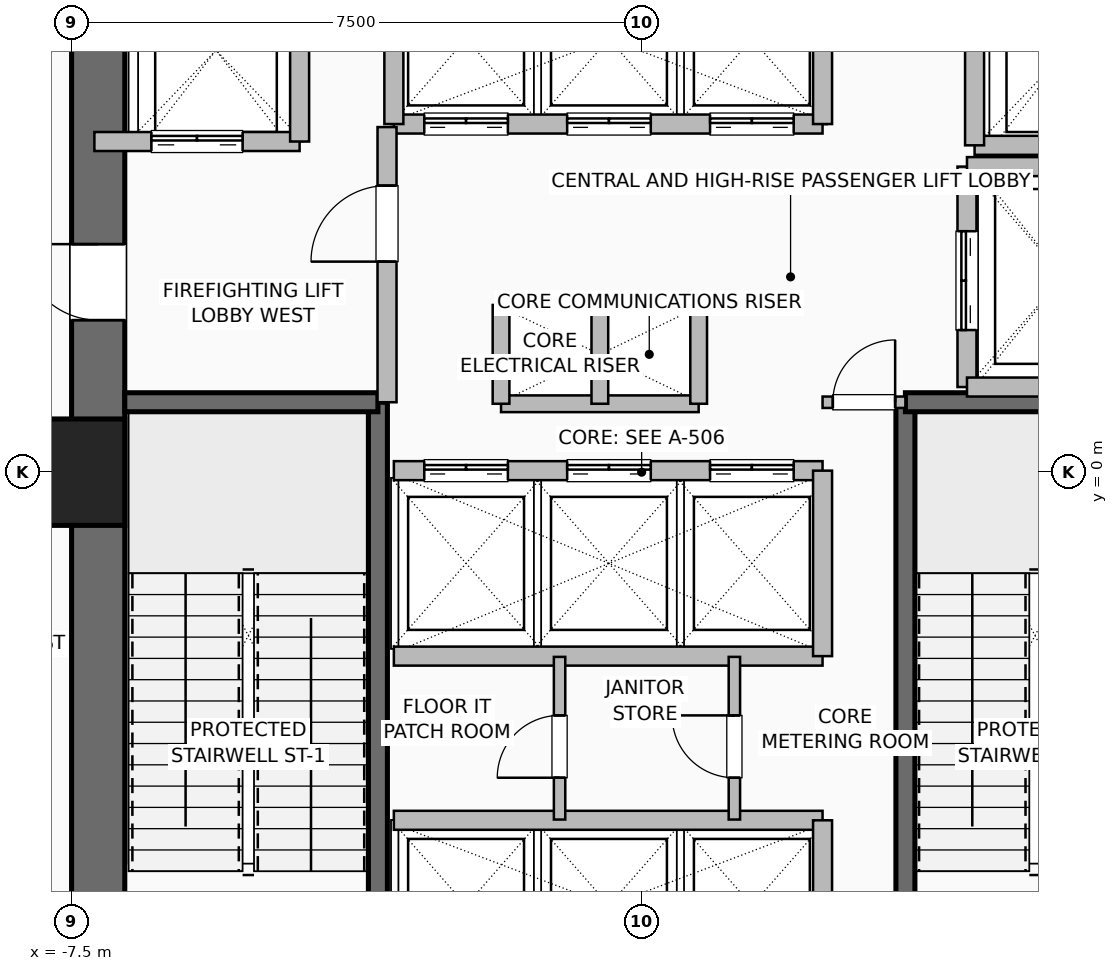
"""IFC4 building model, lengths in metres.
Left out: names, types, materials, properties, quantities, classifications, styles, units other than length and angle.
Written with IfcOpenShell. Run it as: python <this file> out.ifc"""

import sys

from ifc_helpers import new_model, si_unit, direction, frame, frame_2d, origin, origin_2d, place, context, subcontext, project, spatial, rectangle, hollow_rectangle, extrude, element, fill, save


model = new_model("IFC4")
c1 = context("Model", 3, precision=1e-05, world=origin(), true_north=direction((0.0, 1.0)))
c2 = subcontext(c1, "Body", "Model", "MODEL_VIEW")
j1 = project(units=[si_unit("LENGTHUNIT", "METRE"), si_unit("PLANEANGLEUNIT", "RADIAN")], contexts=[c1])
p1 = place(None, origin())
s1 = spatial("IfcSite", under=j1, at=p1, CompositionType="ELEMENT")
p2 = place(p1, origin())
s2 = spatial("IfcBuilding", under=s1, at=p2, CompositionType="ELEMENT")
p3 = place(p2, frame((0.0, 0.0, 16.2)))
s3 = spatial("IfcBuildingStorey", under=s2, at=p3, CompositionType="ELEMENT", Elevation=16.2)
p4 = place(p3, frame((-7.5, 0.0, 0.0), z_axis=(0.0, 0.0, 1.0), x_axis=(1.0, 0.0, 0.0)))
e1 = element("IfcColumn", 1, at=p4, inside=s3, PredefinedType="COLUMN", context=c2, shape_type="SweptSolid", body=[
    extrude(hollow_rectangle(XDim=1.4, YDim=1.4, WallThickness=0.06, at=origin_2d()), origin(), (0.0, 0.0, 1.0), 5.4),
])
p5 = place(p3, frame((-7.15, -7.5, 0.0), z_axis=(0.0, 0.0, 1.0), x_axis=(0.0, 1.0, 0.0)))
e2 = element("IfcWall", 2, at=p5, inside=s3, PredefinedType="SHEAR", context=c2, shape_type="SweptSolid", body=[
    extrude(rectangle(XDim=15.0, YDim=0.7, at=frame_2d((7.5, 0.0))), origin(), (0.0, 0.0, 1.0), 5.0),
])
p6 = place(p5, frame((9.5, 0.0, 0.0)))
e3 = element("IfcOpeningElement", 3, at=p6, cuts=e2, PredefinedType="OPENING", context=c2, shape_type="SweptSolid", body=[
    extrude(rectangle(XDim=1.0, YDim=2.08, at=frame_2d((0.5, 1.04))), frame((0.0, 0.36, 0.0), z_axis=(0.0, -1.0, 0.0), x_axis=(1.0, 0.0, 0.0)), (0.0, 0.0, 1.0), 0.72),
])
p7 = place(p3, frame((-3.47, -6.8, 0.0), z_axis=(0.0, 0.0, 1.0), x_axis=(0.0, 1.0, 0.0)))
e4 = element("IfcWall", 4, at=p7, inside=s3, PredefinedType="SHEAR", context=c2, shape_type="SweptSolid", body=[
    extrude(rectangle(XDim=7.72, YDim=0.25, at=frame_2d((3.86, 0.0))), origin(), (0.0, 0.0, 1.0), 5.0),
])
p8 = place(p3, frame((-6.8, 0.92, 0.0), z_axis=(0.0, 0.0, 1.0), x_axis=(1.0, 0.0, 0.0)))
e5 = element("IfcWall", 5, at=p8, inside=s3, PredefinedType="SHEAR", context=c2, shape_type="SweptSolid", body=[
    extrude(rectangle(XDim=3.33, YDim=0.25, at=frame_2d((1.665, 0.0))), origin(), (0.0, 0.0, 1.0), 5.0),
])
p9 = place(p3, frame((3.47, -6.8, 0.0), z_axis=(0.0, 0.0, 1.0), x_axis=(0.0, 1.0, 0.0)))
e6 = element("IfcWall", 6, at=p9, inside=s3, PredefinedType="SHEAR", context=c2, shape_type="SweptSolid", body=[
    extrude(rectangle(XDim=7.72, YDim=0.25, at=frame_2d((3.86, 0.0))), origin(), (0.0, 0.0, 1.0), 5.0),
])
p10 = place(p3, frame((3.47, 0.92, 0.0), z_axis=(0.0, 0.0, 1.0), x_axis=(1.0, 0.0, 0.0)))
e7 = element("IfcWall", 7, at=p10, inside=s3, PredefinedType="SHEAR", context=c2, shape_type="SweptSolid", body=[
    extrude(rectangle(XDim=3.33, YDim=0.25, at=frame_2d((1.665, 0.0))), origin(), (0.0, 0.0, 1.0), 5.0),
])
for number, where, z_axis, x_axis in (
    (8, (-1.85, 2.2, 0.0), (0.0, 0.0, 1.0), (1.0, 0.0, 0.0)),
    (9, (-1.85, 0.9, 0.0), (0.0, 0.0, 1.0), (1.0, 0.0, 0.0)),
):
    element("IfcWall", number, at=place(p3, frame(where, z_axis=z_axis, x_axis=x_axis)), inside=s3, PredefinedType="PARTITIONING", context=c2, shape_type="SweptSolid", body=[
        extrude(rectangle(XDim=2.6, YDim=0.22, at=frame_2d((1.3, 0.0))), origin(), (0.0, 0.0, 1.0), 5.0),
    ])
for number, where, z_axis, x_axis in (
    (10, (-0.55, 0.9, 0.0), (0.0, 0.0, 1.0), (0.0, 1.0, 0.0)),
    (11, (0.75, 0.9, 0.0), (0.0, 0.0, 1.0), (0.0, 1.0, 0.0)),
    (12, (-1.85, 0.9, 0.0), (0.0, 0.0, 1.0), (0.0, 1.0, 0.0)),
):
    element("IfcWall", number, at=place(p3, frame(where, z_axis=z_axis, x_axis=x_axis)), inside=s3, PredefinedType="PARTITIONING", context=c2, shape_type="SweptSolid", body=[
        extrude(rectangle(XDim=1.3, YDim=0.22, at=frame_2d((0.65, 0.0))), origin(), (0.0, 0.0, 1.0), 5.0),
    ])
p11 = place(p3, frame((-3.26, -4.58, 0.0), z_axis=(0.0, 0.0, 1.0), x_axis=(1.0, 0.0, 0.0)))
e13 = element("IfcWall", 13, at=p11, inside=s3, PredefinedType="SHEAR", context=c2, shape_type="SweptSolid", body=[
    extrude(rectangle(XDim=5.64, YDim=0.25, at=frame_2d((2.82, 0.0))), origin(), (0.0, 0.0, 1.0), 5.0),
])
p12 = place(p3, frame((2.38, -6.8, 0.0), z_axis=(0.0, 0.0, 1.0), x_axis=(0.0, 1.0, 0.0)))
e14 = element("IfcWall", 14, at=p12, inside=s3, PredefinedType="SHEAR", context=c2, shape_type="SweptSolid", body=[
    extrude(rectangle(XDim=2.22, YDim=0.25, at=frame_2d((1.11, 0.0))), origin(), (0.0, 0.0, 1.0), 5.0),
])
p13 = place(p3, frame((-3.26, 0.02, 0.0), z_axis=(0.0, 0.0, 1.0), x_axis=(1.0, 0.0, 0.0)))
e15 = element("IfcWall", 15, at=p13, inside=s3, PredefinedType="SHEAR", context=c2, shape_type="SweptSolid", body=[
    extrude(rectangle(XDim=5.64, YDim=0.25, at=frame_2d((2.82, 0.0))), origin(), (0.0, 0.0, 1.0), 5.0),
])
p14 = place(p13, frame((0.4, 0.0, 0.0)))
e16 = element("IfcOpeningElement", 16, at=p14, cuts=e15, PredefinedType="OPENING", context=c2, shape_type="SweptSolid", body=[
    extrude(rectangle(XDim=1.1, YDim=2.2, at=frame_2d((0.55, 1.1))), frame((0.0, 0.135, 0.0), z_axis=(0.0, -1.0, 0.0), x_axis=(1.0, 0.0, 0.0)), (0.0, 0.0, 1.0), 0.27),
])
p15 = place(p13, frame((2.28, 0.0, 0.0)))
e17 = element("IfcOpeningElement", 17, at=p15, cuts=e15, PredefinedType="OPENING", context=c2, shape_type="SweptSolid", body=[
    extrude(rectangle(XDim=1.1, YDim=2.2, at=frame_2d((0.55, 1.1))), frame((0.0, 0.135, 0.0), z_axis=(0.0, -1.0, 0.0), x_axis=(1.0, 0.0, 0.0)), (0.0, 0.0, 1.0), 0.27),
])
p16 = place(p13, frame((4.16, 0.0, 0.0)))
e18 = element("IfcOpeningElement", 18, at=p16, cuts=e15, PredefinedType="OPENING", context=c2, shape_type="SweptSolid", body=[
    extrude(rectangle(XDim=1.1, YDim=2.2, at=frame_2d((0.55, 1.1))), frame((0.0, 0.135, 0.0), z_axis=(0.0, -1.0, 0.0), x_axis=(1.0, 0.0, 0.0)), (0.0, 0.0, 1.0), 0.27),
])
p17 = place(p3, frame((-3.26, -2.42, 0.0), z_axis=(0.0, 0.0, 1.0), x_axis=(1.0, 0.0, 0.0)))
e19 = element("IfcWall", 19, at=p17, inside=s3, PredefinedType="SHEAR", context=c2, shape_type="SweptSolid", body=[
    extrude(rectangle(XDim=5.64, YDim=0.25, at=frame_2d((2.82, 0.0))), origin(), (0.0, 0.0, 1.0), 5.0),
])
p18 = place(p3, frame((2.38, -2.42, 0.0), z_axis=(0.0, 0.0, 1.0), x_axis=(0.0, 1.0, 0.0)))
e20 = element("IfcWall", 20, at=p18, inside=s3, PredefinedType="SHEAR", context=c2, shape_type="SweptSolid", body=[
    extrude(rectangle(XDim=2.44, YDim=0.25, at=frame_2d((1.22, 0.0))), origin(), (0.0, 0.0, 1.0), 5.0),
])
p19 = place(p3, frame((-3.26, 4.58, 0.0), z_axis=(0.0, 0.0, 1.0), x_axis=(1.0, 0.0, 0.0)))
e21 = element("IfcWall", 21, at=p19, inside=s3, PredefinedType="SHEAR", context=c2, shape_type="SweptSolid", body=[
    extrude(rectangle(XDim=5.64, YDim=0.25, at=frame_2d((2.82, 0.0))), origin(), (0.0, 0.0, 1.0), 5.0),
])
p20 = place(p19, frame((0.4, 0.0, 0.0)))
e22 = element("IfcOpeningElement", 22, at=p20, cuts=e21, PredefinedType="OPENING", context=c2, shape_type="SweptSolid", body=[
    extrude(rectangle(XDim=1.1, YDim=2.2, at=frame_2d((0.55, 1.1))), frame((0.0, 0.135, 0.0), z_axis=(0.0, -1.0, 0.0), x_axis=(1.0, 0.0, 0.0)), (0.0, 0.0, 1.0), 0.27),
])
p21 = place(p19, frame((2.28, 0.0, 0.0)))
e23 = element("IfcOpeningElement", 23, at=p21, cuts=e21, PredefinedType="OPENING", context=c2, shape_type="SweptSolid", body=[
    extrude(rectangle(XDim=1.1, YDim=2.2, at=frame_2d((0.55, 1.1))), frame((0.0, 0.135, 0.0), z_axis=(0.0, -1.0, 0.0), x_axis=(1.0, 0.0, 0.0)), (0.0, 0.0, 1.0), 0.27),
])
p22 = place(p19, frame((4.16, 0.0, 0.0)))
e24 = element("IfcOpeningElement", 24, at=p22, cuts=e21, PredefinedType="OPENING", context=c2, shape_type="SweptSolid", body=[
    extrude(rectangle(XDim=1.1, YDim=2.2, at=frame_2d((0.55, 1.1))), frame((0.0, 0.135, 0.0), z_axis=(0.0, -1.0, 0.0), x_axis=(1.0, 0.0, 0.0)), (0.0, 0.0, 1.0), 0.27),
])
for number, where, z_axis, x_axis in (
    (25, (-3.26, 4.58, 0.0), (0.0, 0.0, 1.0), (0.0, 1.0, 0.0)),
    (26, (2.38, 4.58, 0.0), (0.0, 0.0, 1.0), (0.0, 1.0, 0.0)),
):
    element("IfcWall", number, at=place(p3, frame(where, z_axis=z_axis, x_axis=x_axis)), inside=s3, PredefinedType="SHEAR", context=c2, shape_type="SweptSolid", body=[
        extrude(rectangle(XDim=2.22, YDim=0.25, at=frame_2d((1.11, 0.0))), origin(), (0.0, 0.0, 1.0), 5.0),
    ])
p23 = place(p3, frame((-7.2, 4.35, 0.0), z_axis=(0.0, 0.0, 1.0), x_axis=(1.0, 0.0, 0.0)))
e27 = element("IfcWall", 27, at=p23, inside=s3, PredefinedType="SHEAR", context=c2, shape_type="SweptSolid", body=[
    extrude(rectangle(XDim=2.7, YDim=0.25, at=frame_2d((1.35, 0.0))), origin(), (0.0, 0.0, 1.0), 5.0),
])
p24 = place(p23, frame((0.75, 0.0, 0.0)))
e28 = element("IfcOpeningElement", 28, at=p24, cuts=e27, PredefinedType="OPENING", context=c2, shape_type="SweptSolid", body=[
    extrude(rectangle(XDim=1.2, YDim=2.2, at=frame_2d((0.6, 1.1))), frame((0.0, 0.135, 0.0), z_axis=(0.0, -1.0, 0.0), x_axis=(1.0, 0.0, 0.0)), (0.0, 0.0, 1.0), 0.27),
])
p25 = place(p3, frame((-4.5, 4.35, 0.0), z_axis=(0.0, 0.0, 1.0), x_axis=(0.0, 1.0, 0.0)))
e29 = element("IfcWall", 29, at=p25, inside=s3, PredefinedType="SHEAR", context=c2, shape_type="SweptSolid", body=[
    extrude(rectangle(XDim=2.85, YDim=0.25, at=frame_2d((1.425, 0.0))), origin(), (0.0, 0.0, 1.0), 5.0),
])
p26 = place(p3, frame((4.38, 4.3, 0.0), z_axis=(0.0, 0.0, 1.0), x_axis=(1.0, 0.0, 0.0)))
e30 = element("IfcWall", 30, at=p26, inside=s3, PredefinedType="SHEAR", context=c2, shape_type="SweptSolid", body=[
    extrude(rectangle(XDim=2.42, YDim=0.25, at=frame_2d((1.21, 0.0))), origin(), (0.0, 0.0, 1.0), 5.0),
])
p27 = place(p3, frame((4.38, 4.3, 0.0), z_axis=(0.0, 0.0, 1.0), x_axis=(0.0, 1.0, 0.0)))
e31 = element("IfcWall", 31, at=p27, inside=s3, PredefinedType="SHEAR", context=c2, shape_type="SweptSolid", body=[
    extrude(rectangle(XDim=2.5, YDim=0.25, at=frame_2d((1.25, 0.0))), origin(), (0.0, 0.0, 1.0), 5.0),
])
p28 = place(p3, frame((4.28, 1.12, 0.0), z_axis=(0.0, 0.0, 1.0), x_axis=(0.0, 1.0, 0.0)))
e32 = element("IfcWall", 32, at=p28, inside=s3, PredefinedType="SHEAR", context=c2, shape_type="SweptSolid", body=[
    extrude(rectangle(XDim=2.9, YDim=0.25, at=frame_2d((1.45, 0.0))), origin(), (0.0, 0.0, 1.0), 5.0),
])
p29 = place(p28, frame((0.75, 0.0, 0.0)))
e33 = element("IfcOpeningElement", 33, at=p29, cuts=e32, PredefinedType="OPENING", context=c2, shape_type="SweptSolid", body=[
    extrude(rectangle(XDim=1.3, YDim=2.3, at=frame_2d((0.65, 1.15))), frame((0.0, 0.135, 0.0), z_axis=(0.0, -1.0, 0.0), x_axis=(1.0, 0.0, 0.0)), (0.0, 0.0, 1.0), 0.27),
])
for number, where, z_axis, x_axis in (
    (34, (4.28, 1.12, 0.0), (0.0, 0.0, 1.0), (1.0, 0.0, 0.0)),
    (35, (4.28, 4.02, 0.0), (0.0, 0.0, 1.0), (1.0, 0.0, 0.0)),
):
    element("IfcWall", number, at=place(p3, frame(where, z_axis=z_axis, x_axis=x_axis)), inside=s3, PredefinedType="SHEAR", context=c2, shape_type="SweptSolid", body=[
        extrude(rectangle(XDim=2.52, YDim=0.25, at=frame_2d((1.26, 0.0))), origin(), (0.0, 0.0, 1.0), 5.0),
    ])
p30 = place(p3, frame((-3.35, 0.92, 0.0), z_axis=(0.0, 0.0, 1.0), x_axis=(0.0, 1.0, 0.0)))
e36 = element("IfcWall", 36, at=p30, inside=s3, PredefinedType="SHEAR", context=c2, shape_type="SweptSolid", body=[
    extrude(rectangle(XDim=3.62, YDim=0.25, at=frame_2d((1.81, 0.0))), origin(), (0.0, 0.0, 1.0), 5.0),
])
p31 = place(p30, frame((1.85, 0.0, 0.0)))
e37 = element("IfcOpeningElement", 37, at=p31, cuts=e36, PredefinedType="OPENING", context=c2, shape_type="SweptSolid", body=[
    extrude(rectangle(XDim=1.0, YDim=2.08, at=frame_2d((0.5, 1.04))), frame((0.0, 0.135, 0.0), z_axis=(0.0, -1.0, 0.0), x_axis=(1.0, 0.0, 0.0)), (0.0, 0.0, 1.0), 0.27),
])
p32 = place(p3, frame((2.38, 0.92, 0.0), z_axis=(0.0, 0.0, 1.0), x_axis=(1.0, 0.0, 0.0)))
e38 = element("IfcWall", 38, at=p32, inside=s3, PredefinedType="PARTITIONING", context=c2, shape_type="SweptSolid", body=[
    extrude(rectangle(XDim=1.09, YDim=0.15, at=frame_2d((0.545, 0.0))), origin(), (0.0, 0.0, 1.0), 5.0),
])
p33 = place(p32, frame((0.135, 0.0, 0.0)))
e39 = element("IfcOpeningElement", 39, at=p33, cuts=e38, PredefinedType="OPENING", context=c2, shape_type="SweptSolid", body=[
    extrude(rectangle(XDim=0.82, YDim=2.05, at=frame_2d((0.41, 1.025))), frame((0.0, 0.085, 0.0), z_axis=(0.0, -1.0, 0.0), x_axis=(1.0, 0.0, 0.0)), (0.0, 0.0, 1.0), 0.17),
])
p34 = place(p3, frame((-1.08, -4.57, 0.0), z_axis=(0.0, 0.0, 1.0), x_axis=(0.0, 1.0, 0.0)))
e40 = element("IfcWall", 40, at=p34, inside=s3, PredefinedType="PARTITIONING", context=c2, shape_type="SweptSolid", body=[
    extrude(rectangle(XDim=2.14, YDim=0.15, at=frame_2d((1.07, 0.0))), origin(), (0.0, 0.0, 1.0), 5.0),
])
p35 = place(p34, frame((0.55, 0.0, 0.0)))
e41 = element("IfcOpeningElement", 41, at=p35, cuts=e40, PredefinedType="OPENING", context=c2, shape_type="SweptSolid", body=[
    extrude(rectangle(XDim=0.82, YDim=2.05, at=frame_2d((0.41, 1.025))), frame((0.0, 0.085, 0.0), z_axis=(0.0, -1.0, 0.0), x_axis=(1.0, 0.0, 0.0)), (0.0, 0.0, 1.0), 0.17),
])
p36 = place(p3, frame((1.22, -4.57, 0.0), z_axis=(0.0, 0.0, 1.0), x_axis=(0.0, 1.0, 0.0)))
e42 = element("IfcWall", 42, at=p36, inside=s3, PredefinedType="PARTITIONING", context=c2, shape_type="SweptSolid", body=[
    extrude(rectangle(XDim=2.14, YDim=0.15, at=frame_2d((1.07, 0.0))), origin(), (0.0, 0.0, 1.0), 5.0),
])
p37 = place(p36, frame((0.55, 0.0, 0.0)))
e43 = element("IfcOpeningElement", 43, at=p37, cuts=e42, PredefinedType="OPENING", context=c2, shape_type="SweptSolid", body=[
    extrude(rectangle(XDim=0.82, YDim=2.05, at=frame_2d((0.41, 1.025))), frame((0.0, 0.085, 0.0), z_axis=(0.0, -1.0, 0.0), x_axis=(1.0, 0.0, 0.0)), (0.0, 0.0, 1.0), 0.17),
])
p38 = place(p6, origin())
e44 = element("IfcDoor", 44, at=p38, inside=s3, OperationType="SINGLE_SWING_RIGHT", PredefinedType="DOOR", context=c2, shape_type="SweptSolid", body=[
    extrude(rectangle(XDim=1.0, YDim=2.08, at=frame_2d((0.5, 1.04))), frame((0.0, 0.025, 0.0), z_axis=(0.0, -1.0, 0.0), x_axis=(1.0, 0.0, 0.0)), (0.0, 0.0, 1.0), 0.05),
])
fill(e3, e44)
p39 = place(p14, origin())
e45 = element("IfcDoor", 45, at=p39, inside=s3, OperationType="DOUBLE_DOOR_SLIDING", PredefinedType="DOOR", context=c2, shape_type="SweptSolid", body=[
    extrude(rectangle(XDim=1.1, YDim=2.2, at=frame_2d((0.55, 1.1))), frame((0.0, 0.025, 0.0), z_axis=(0.0, -1.0, 0.0), x_axis=(1.0, 0.0, 0.0)), (0.0, 0.0, 1.0), 0.05),
])
fill(e16, e45)
p40 = place(p15, origin())
e46 = element("IfcDoor", 46, at=p40, inside=s3, OperationType="DOUBLE_DOOR_SLIDING", PredefinedType="DOOR", context=c2, shape_type="SweptSolid", body=[
    extrude(rectangle(XDim=1.1, YDim=2.2, at=frame_2d((0.55, 1.1))), frame((0.0, 0.025, 0.0), z_axis=(0.0, -1.0, 0.0), x_axis=(1.0, 0.0, 0.0)), (0.0, 0.0, 1.0), 0.05),
])
fill(e17, e46)
p41 = place(p16, origin())
e47 = element("IfcDoor", 47, at=p41, inside=s3, OperationType="DOUBLE_DOOR_SLIDING", PredefinedType="DOOR", context=c2, shape_type="SweptSolid", body=[
    extrude(rectangle(XDim=1.1, YDim=2.2, at=frame_2d((0.55, 1.1))), frame((0.0, 0.025, 0.0), z_axis=(0.0, -1.0, 0.0), x_axis=(1.0, 0.0, 0.0)), (0.0, 0.0, 1.0), 0.05),
])
fill(e18, e47)
p42 = place(p20, origin())
e48 = element("IfcDoor", 48, at=p42, inside=s3, OperationType="DOUBLE_DOOR_SLIDING", PredefinedType="DOOR", context=c2, shape_type="SweptSolid", body=[
    extrude(rectangle(XDim=1.1, YDim=2.2, at=frame_2d((0.55, 1.1))), frame((0.0, 0.025, 0.0), z_axis=(0.0, -1.0, 0.0), x_axis=(1.0, 0.0, 0.0)), (0.0, 0.0, 1.0), 0.05),
])
fill(e22, e48)
p43 = place(p21, origin())
e49 = element("IfcDoor", 49, at=p43, inside=s3, OperationType="DOUBLE_DOOR_SLIDING", PredefinedType="DOOR", context=c2, shape_type="SweptSolid", body=[
    extrude(rectangle(XDim=1.1, YDim=2.2, at=frame_2d((0.55, 1.1))), frame((0.0, 0.025, 0.0), z_axis=(0.0, -1.0, 0.0), x_axis=(1.0, 0.0, 0.0)), (0.0, 0.0, 1.0), 0.05),
])
fill(e23, e49)
p44 = place(p22, origin())
e50 = element("IfcDoor", 50, at=p44, inside=s3, OperationType="DOUBLE_DOOR_SLIDING", PredefinedType="DOOR", context=c2, shape_type="SweptSolid", body=[
    extrude(rectangle(XDim=1.1, YDim=2.2, at=frame_2d((0.55, 1.1))), frame((0.0, 0.025, 0.0), z_axis=(0.0, -1.0, 0.0), x_axis=(1.0, 0.0, 0.0)), (0.0, 0.0, 1.0), 0.05),
])
fill(e24, e50)
p45 = place(p24, origin())
e51 = element("IfcDoor", 51, at=p45, inside=s3, OperationType="DOUBLE_DOOR_SLIDING", PredefinedType="DOOR", context=c2, shape_type="SweptSolid", body=[
    extrude(rectangle(XDim=1.2, YDim=2.2, at=frame_2d((0.6, 1.1))), frame((0.0, 0.025, 0.0), z_axis=(0.0, -1.0, 0.0), x_axis=(1.0, 0.0, 0.0)), (0.0, 0.0, 1.0), 0.05),
])
fill(e28, e51)
p46 = place(p29, origin())
e52 = element("IfcDoor", 52, at=p46, inside=s3, OperationType="DOUBLE_DOOR_SLIDING", PredefinedType="DOOR", context=c2, shape_type="SweptSolid", body=[
    extrude(rectangle(XDim=1.3, YDim=2.3, at=frame_2d((0.65, 1.15))), frame((0.0, 0.025, 0.0), z_axis=(0.0, -1.0, 0.0), x_axis=(1.0, 0.0, 0.0)), (0.0, 0.0, 1.0), 0.05),
])
fill(e33, e52)
p47 = place(p31, origin())
e53 = element("IfcDoor", 53, at=p47, inside=s3, OperationType="SINGLE_SWING_LEFT", PredefinedType="DOOR", context=c2, shape_type="SweptSolid", body=[
    extrude(rectangle(XDim=1.0, YDim=2.08, at=frame_2d((0.5, 1.04))), frame((0.0, 0.025, 0.0), z_axis=(0.0, -1.0, 0.0), x_axis=(1.0, 0.0, 0.0)), (0.0, 0.0, 1.0), 0.05),
])
fill(e37, e53)
p48 = place(p33, origin())
e54 = element("IfcDoor", 54, at=p48, inside=s3, OperationType="SINGLE_SWING_RIGHT", PredefinedType="DOOR", context=c2, shape_type="SweptSolid", body=[
    extrude(rectangle(XDim=0.82, YDim=2.05, at=frame_2d((0.41, 1.025))), frame((0.0, 0.025, 0.0), z_axis=(0.0, -1.0, 0.0), x_axis=(1.0, 0.0, 0.0)), (0.0, 0.0, 1.0), 0.05),
])
fill(e39, e54)
p49 = place(p35, origin())
e55 = element("IfcDoor", 55, at=p49, inside=s3, OperationType="SINGLE_SWING_LEFT", PredefinedType="DOOR", context=c2, shape_type="SweptSolid", body=[
    extrude(rectangle(XDim=0.82, YDim=2.05, at=frame_2d((0.41, 1.025))), frame((0.0, 0.025, 0.0), z_axis=(0.0, -1.0, 0.0), x_axis=(1.0, 0.0, 0.0)), (0.0, 0.0, 1.0), 0.05),
])
fill(e41, e55)
p50 = place(p37, origin())
e56 = element("IfcDoor", 56, at=p50, inside=s3, OperationType="SINGLE_SWING_RIGHT", PredefinedType="DOOR", context=c2, shape_type="SweptSolid", body=[
    extrude(rectangle(XDim=0.82, YDim=2.05, at=frame_2d((0.41, 1.025))), frame((0.0, 0.025, 0.0), z_axis=(0.0, -1.0, 0.0), x_axis=(1.0, 0.0, 0.0)), (0.0, 0.0, 1.0), 0.05),
])
fill(e43, e56)
save(model, sys.argv[1])
